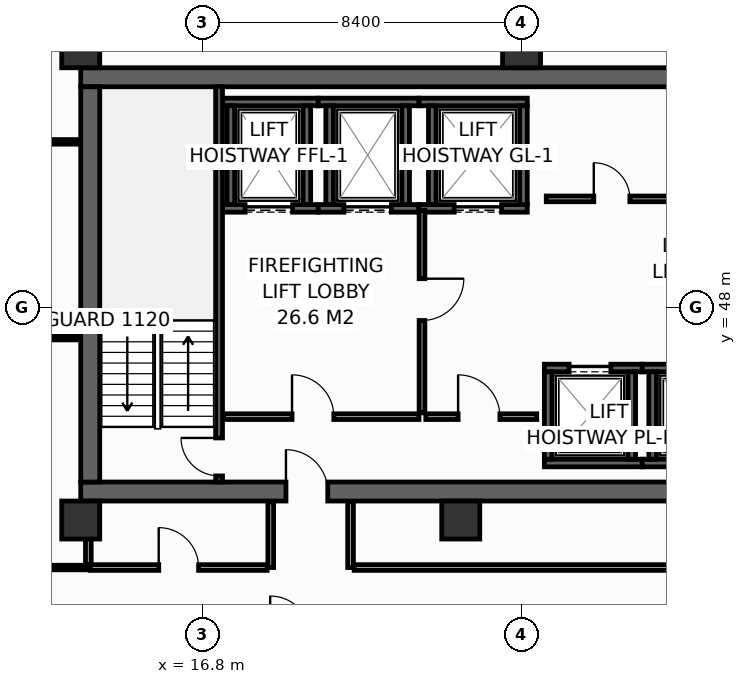
"""IFC4 building model, lengths in metres.
Left out: names, types, materials, properties, quantities, classifications, styles, units other than length and angle.
Written with IfcOpenShell. Run it as: python <this file> out.ifc"""

import sys

from ifc_helpers import new_model, si_unit, direction, frame, frame_2d, origin, origin_2d, place, context, subcontext, project, spatial, rectangle, hollow_rectangle, extrude, element, fill, save


model = new_model("IFC4")
c1 = context("Model", 3, precision=1e-05, world=origin(), true_north=direction((0.0, 1.0)))
c2 = subcontext(c1, "Body", "Model", "MODEL_VIEW")
j1 = project(units=[si_unit("LENGTHUNIT", "METRE"), si_unit("PLANEANGLEUNIT", "RADIAN")], contexts=[c1])
p1 = place(None, origin())
s1 = spatial("IfcSite", under=j1, at=p1, CompositionType="ELEMENT")
p2 = place(p1, origin())
s2 = spatial("IfcBuilding", under=s1, at=p2, CompositionType="ELEMENT")
p3 = place(p2, frame((0.0, 0.0, 156.2)))
s3 = spatial("IfcBuildingStorey", under=s2, at=p3, CompositionType="ELEMENT", Elevation=156.2)
p4 = place(p3, frame((13.6, 43.15, 0.0), z_axis=(0.0, 0.0, 1.0), x_axis=(1.0, 0.0, 0.0)))
e1 = element("IfcWall", 1, at=p4, inside=s3, PredefinedType="SHEAR", context=c2, shape_type="SweptSolid", body=[
    extrude(rectangle(XDim=32.7, YDim=0.5, at=frame_2d((16.35, 0.0))), origin(), (0.0, 0.0, 1.0), 3.55),
])
p5 = place(p4, frame((5.4, 0.0, 0.0)))
e2 = element("IfcOpeningElement", 2, at=p5, cuts=e1, PredefinedType="OPENING", context=c2, shape_type="SweptSolid", body=[
    extrude(rectangle(XDim=1.1, YDim=2.15, at=frame_2d((0.55, 1.075))), frame((0.0, 0.26, 0.0), z_axis=(0.0, -1.0, 0.0), x_axis=(1.0, 0.0, 0.0)), (0.0, 0.0, 1.0), 0.52),
])
p6 = place(p4, frame((25.6, 0.0, 0.0)))
e3 = element("IfcOpeningElement", 3, at=p6, cuts=e1, PredefinedType="OPENING", context=c2, shape_type="SweptSolid", body=[
    extrude(rectangle(XDim=1.1, YDim=2.15, at=frame_2d((0.55, 1.075))), frame((0.0, 0.26, 0.0), z_axis=(0.0, -1.0, 0.0), x_axis=(1.0, 0.0, 0.0)), (0.0, 0.0, 1.0), 0.52),
])
p7 = place(p3, frame((13.6, 54.05, 0.0), z_axis=(0.0, 0.0, 1.0), x_axis=(1.0, 0.0, 0.0)))
e4 = element("IfcWall", 4, at=p7, inside=s3, PredefinedType="SHEAR", context=c2, shape_type="SweptSolid", body=[
    extrude(rectangle(XDim=32.7, YDim=0.5, at=frame_2d((16.35, 0.0))), origin(), (0.0, 0.0, 1.0), 3.55),
])
p8 = place(p3, frame((13.85, 43.4, 0.0), z_axis=(0.0, 0.0, 1.0), x_axis=(0.0, 1.0, 0.0)))
e5 = element("IfcWall", 5, at=p8, inside=s3, PredefinedType="SHEAR", context=c2, shape_type="SweptSolid", body=[
    extrude(rectangle(XDim=10.4, YDim=0.5, at=frame_2d((5.2, 0.0))), origin(), (0.0, 0.0, 1.0), 3.55),
])
for number, where, z_axis, x_axis in (
    (6, (13.6, 54.8, 0.0), (0.0, 0.0, 1.0), (1.0, 0.0, 0.0)),
    (7, (25.2, 54.8, 0.0), (0.0, 0.0, 1.0), (1.0, 0.0, 0.0)),
    (8, (13.6, 42.4, 0.0), (0.0, 0.0, 1.0), (1.0, 0.0, 0.0)),
    (9, (23.6, 42.4, 0.0), (0.0, 0.0, 1.0), (1.0, 0.0, 0.0)),
):
    element("IfcColumn", number, at=place(p3, frame(where, z_axis=z_axis, x_axis=x_axis)), inside=s3, PredefinedType="COLUMN", context=c2, shape_type="SweptSolid", body=[
        extrude(hollow_rectangle(XDim=1.0, YDim=1.0, WallThickness=0.045, at=origin_2d()), origin(), (0.0, 0.0, 1.0), 3.8),
    ])
p9 = place(p3, frame((17.33, 50.6, 0.0), z_axis=(0.0, 0.0, 1.0), x_axis=(1.0, 0.0, 0.0)))
e10 = element("IfcWall", 10, at=p9, inside=s3, PredefinedType="SHEAR", context=c2, shape_type="SweptSolid", body=[
    extrude(rectangle(XDim=2.52, YDim=0.2, at=frame_2d((1.26, 0.0))), origin(), (0.0, 0.0, 1.0), 3.55),
])
p10 = place(p9, frame((0.595, 0.0, 0.0)))
e11 = element("IfcOpeningElement", 11, at=p10, cuts=e10, PredefinedType="OPENING", context=c2, shape_type="SweptSolid", body=[
    extrude(rectangle(XDim=1.25, YDim=2.3, at=frame_2d((0.625, 1.15))), frame((0.0, 0.11, 0.0), z_axis=(0.0, -1.0, 0.0), x_axis=(1.0, 0.0, 0.0)), (0.0, 0.0, 1.0), 0.22),
])
p11 = place(p3, frame((17.33, 53.4, 0.0), z_axis=(0.0, 0.0, 1.0), x_axis=(1.0, 0.0, 0.0)))
e12 = element("IfcWall", 12, at=p11, inside=s3, PredefinedType="SHEAR", context=c2, shape_type="SweptSolid", body=[
    extrude(rectangle(XDim=2.52, YDim=0.2, at=frame_2d((1.26, 0.0))), origin(), (0.0, 0.0, 1.0), 3.55),
])
for number, where, z_axis, x_axis in (
    (13, (17.55, 50.7, 0.0), (0.0, 0.0, 1.0), (0.0, 1.0, 0.0)),
    (14, (19.55, 50.7, 0.0), (0.0, 0.0, 1.0), (0.0, 1.0, 0.0)),
):
    element("IfcWall", number, at=place(p3, frame(where, z_axis=z_axis, x_axis=x_axis)), inside=s3, PredefinedType="SHEAR", context=c2, shape_type="SweptSolid", body=[
        extrude(rectangle(XDim=2.6, YDim=0.2, at=frame_2d((1.3, 0.0))), origin(), (0.0, 0.0, 1.0), 3.55),
    ])
p12 = place(p3, frame((19.85, 50.6, 0.0), z_axis=(0.0, 0.0, 1.0), x_axis=(1.0, 0.0, 0.0)))
e15 = element("IfcWall", 15, at=p12, inside=s3, PredefinedType="SHEAR", context=c2, shape_type="SweptSolid", body=[
    extrude(rectangle(XDim=2.65, YDim=0.2, at=frame_2d((1.325, 0.0))), origin(), (0.0, 0.0, 1.0), 3.55),
])
p13 = place(p12, frame((0.675, 0.0, 0.0)))
e16 = element("IfcOpeningElement", 16, at=p13, cuts=e15, PredefinedType="OPENING", context=c2, shape_type="SweptSolid", body=[
    extrude(rectangle(XDim=1.25, YDim=2.3, at=frame_2d((0.625, 1.15))), frame((0.0, 0.11, 0.0), z_axis=(0.0, -1.0, 0.0), x_axis=(1.0, 0.0, 0.0)), (0.0, 0.0, 1.0), 0.22),
])
p14 = place(p3, frame((19.85, 53.4, 0.0), z_axis=(0.0, 0.0, 1.0), x_axis=(1.0, 0.0, 0.0)))
e17 = element("IfcWall", 17, at=p14, inside=s3, PredefinedType="SHEAR", context=c2, shape_type="SweptSolid", body=[
    extrude(rectangle(XDim=2.65, YDim=0.2, at=frame_2d((1.325, 0.0))), origin(), (0.0, 0.0, 1.0), 3.55),
])
for number, where, z_axis, x_axis in (
    (18, (20.15, 50.7, 0.0), (0.0, 0.0, 1.0), (0.0, 1.0, 0.0)),
    (19, (22.15, 50.7, 0.0), (0.0, 0.0, 1.0), (0.0, 1.0, 0.0)),
):
    element("IfcWall", number, at=place(p3, frame(where, z_axis=z_axis, x_axis=x_axis)), inside=s3, PredefinedType="SHEAR", context=c2, shape_type="SweptSolid", body=[
        extrude(rectangle(XDim=2.6, YDim=0.2, at=frame_2d((1.3, 0.0))), origin(), (0.0, 0.0, 1.0), 3.55),
    ])
p15 = place(p3, frame((22.5, 50.6, 0.0), z_axis=(0.0, 0.0, 1.0), x_axis=(1.0, 0.0, 0.0)))
e20 = element("IfcWall", 20, at=p15, inside=s3, PredefinedType="SHEAR", context=c2, shape_type="SweptSolid", body=[
    extrude(rectangle(XDim=2.85, YDim=0.2, at=frame_2d((1.425, 0.0))), origin(), (0.0, 0.0, 1.0), 3.55),
])
p16 = place(p15, frame((0.925, 0.0, 0.0)))
e21 = element("IfcOpeningElement", 21, at=p16, cuts=e20, PredefinedType="OPENING", context=c2, shape_type="SweptSolid", body=[
    extrude(rectangle(XDim=1.25, YDim=2.3, at=frame_2d((0.625, 1.15))), frame((0.0, 0.11, 0.0), z_axis=(0.0, -1.0, 0.0), x_axis=(1.0, 0.0, 0.0)), (0.0, 0.0, 1.0), 0.22),
])
p17 = place(p3, frame((22.5, 53.4, 0.0), z_axis=(0.0, 0.0, 1.0), x_axis=(1.0, 0.0, 0.0)))
e22 = element("IfcWall", 22, at=p17, inside=s3, PredefinedType="SHEAR", context=c2, shape_type="SweptSolid", body=[
    extrude(rectangle(XDim=2.85, YDim=0.2, at=frame_2d((1.425, 0.0))), origin(), (0.0, 0.0, 1.0), 3.55),
])
for number, where, z_axis, x_axis in (
    (23, (22.85, 50.7, 0.0), (0.0, 0.0, 1.0), (0.0, 1.0, 0.0)),
    (24, (25.25, 50.7, 0.0), (0.0, 0.0, 1.0), (0.0, 1.0, 0.0)),
):
    element("IfcWall", number, at=place(p3, frame(where, z_axis=z_axis, x_axis=x_axis)), inside=s3, PredefinedType="SHEAR", context=c2, shape_type="SweptSolid", body=[
        extrude(rectangle(XDim=2.6, YDim=0.2, at=frame_2d((1.3, 0.0))), origin(), (0.0, 0.0, 1.0), 3.55),
    ])
p18 = place(p3, frame((25.8, 43.9, 0.0), z_axis=(0.0, 0.0, 1.0), x_axis=(1.0, 0.0, 0.0)))
e25 = element("IfcWall", 25, at=p18, inside=s3, PredefinedType="SHEAR", context=c2, shape_type="SweptSolid", body=[
    extrude(rectangle(XDim=2.575, YDim=0.2, at=frame_2d((1.288, 0.0))), origin(), (0.0, 0.0, 1.0), 3.55),
])
p19 = place(p3, frame((25.8, 46.4, 0.0), z_axis=(0.0, 0.0, 1.0), x_axis=(1.0, 0.0, 0.0)))
e26 = element("IfcWall", 26, at=p19, inside=s3, PredefinedType="SHEAR", context=c2, shape_type="SweptSolid", body=[
    extrude(rectangle(XDim=2.575, YDim=0.2, at=frame_2d((1.288, 0.0))), origin(), (0.0, 0.0, 1.0), 3.55),
])
p20 = place(p19, frame((0.65, 0.0, 0.0)))
e27 = element("IfcOpeningElement", 27, at=p20, cuts=e26, PredefinedType="OPENING", context=c2, shape_type="SweptSolid", body=[
    extrude(rectangle(XDim=1.1, YDim=2.2, at=frame_2d((0.55, 1.1))), frame((0.0, 0.11, 0.0), z_axis=(0.0, -1.0, 0.0), x_axis=(1.0, 0.0, 0.0)), (0.0, 0.0, 1.0), 0.22),
])
for number, where, z_axis, x_axis in (
    (28, (25.9, 44.0, 0.0), (0.0, 0.0, 1.0), (0.0, 1.0, 0.0)),
    (29, (28.1, 44.0, 0.0), (0.0, 0.0, 1.0), (0.0, 1.0, 0.0)),
):
    element("IfcWall", number, at=place(p3, frame(where, z_axis=z_axis, x_axis=x_axis)), inside=s3, PredefinedType="SHEAR", context=c2, shape_type="SweptSolid", body=[
        extrude(rectangle(XDim=2.3, YDim=0.2, at=frame_2d((1.15, 0.0))), origin(), (0.0, 0.0, 1.0), 3.55),
    ])
p21 = place(p3, frame((28.375, 43.9, 0.0), z_axis=(0.0, 0.0, 1.0), x_axis=(1.0, 0.0, 0.0)))
e30 = element("IfcWall", 30, at=p21, inside=s3, PredefinedType="SHEAR", context=c2, shape_type="SweptSolid", body=[
    extrude(rectangle(XDim=2.75, YDim=0.2, at=frame_2d((1.375, 0.0))), origin(), (0.0, 0.0, 1.0), 3.55),
])
p22 = place(p3, frame((28.375, 46.4, 0.0), z_axis=(0.0, 0.0, 1.0), x_axis=(1.0, 0.0, 0.0)))
e31 = element("IfcWall", 31, at=p22, inside=s3, PredefinedType="SHEAR", context=c2, shape_type="SweptSolid", body=[
    extrude(rectangle(XDim=2.75, YDim=0.2, at=frame_2d((1.375, 0.0))), origin(), (0.0, 0.0, 1.0), 3.55),
])
p23 = place(p22, frame((0.825, 0.0, 0.0)))
e32 = element("IfcOpeningElement", 32, at=p23, cuts=e31, PredefinedType="OPENING", context=c2, shape_type="SweptSolid", body=[
    extrude(rectangle(XDim=1.1, YDim=2.2, at=frame_2d((0.55, 1.1))), frame((0.0, 0.11, 0.0), z_axis=(0.0, -1.0, 0.0), x_axis=(1.0, 0.0, 0.0)), (0.0, 0.0, 1.0), 0.22),
])
p24 = place(p3, frame((28.65, 44.0, 0.0), z_axis=(0.0, 0.0, 1.0), x_axis=(0.0, 1.0, 0.0)))
e33 = element("IfcWall", 33, at=p24, inside=s3, PredefinedType="SHEAR", context=c2, shape_type="SweptSolid", body=[
    extrude(rectangle(XDim=2.3, YDim=0.2, at=frame_2d((1.15, 0.0))), origin(), (0.0, 0.0, 1.0), 3.55),
])
p25 = place(p3, frame((17.24, 43.4, 0.0), z_axis=(0.0, 0.0, 1.0), x_axis=(0.0, 1.0, 0.0)))
e34 = element("IfcWall", 34, at=p25, inside=s3, PredefinedType="SHEAR", context=c2, shape_type="SweptSolid", body=[
    extrude(rectangle(XDim=10.4, YDim=0.18, at=frame_2d((5.2, 0.0))), origin(), (0.0, 0.0, 1.0), 3.55),
])
p26 = place(p25, frame((0.16, 0.0, 0.0)))
e35 = element("IfcOpeningElement", 35, at=p26, cuts=e34, PredefinedType="OPENING", context=c2, shape_type="SweptSolid", body=[
    extrude(rectangle(XDim=1.0, YDim=2.15, at=frame_2d((0.5, 1.075))), frame((0.0, 0.1, 0.0), z_axis=(0.0, -1.0, 0.0), x_axis=(1.0, 0.0, 0.0)), (0.0, 0.0, 1.0), 0.2),
])
p27 = place(p3, frame((17.36, 45.12, 0.0), z_axis=(0.0, 0.0, 1.0), x_axis=(1.0, 0.0, 0.0)))
e36 = element("IfcWall", 36, at=p27, inside=s3, PredefinedType="PARTITIONING", context=c2, shape_type="SweptSolid", body=[
    extrude(rectangle(XDim=5.14, YDim=0.15, at=frame_2d((2.57, 0.0))), origin(), (0.0, 0.0, 1.0), 3.55),
])
p28 = place(p27, frame((1.8, 0.0, 0.0)))
e37 = element("IfcOpeningElement", 37, at=p28, cuts=e36, PredefinedType="OPENING", context=c2, shape_type="SweptSolid", body=[
    extrude(rectangle(XDim=1.1, YDim=2.15, at=frame_2d((0.55, 1.075))), frame((0.0, 0.085, 0.0), z_axis=(0.0, -1.0, 0.0), x_axis=(1.0, 0.0, 0.0)), (0.0, 0.0, 1.0), 0.17),
])
p29 = place(p3, frame((22.58, 50.55, 0.0), z_axis=(0.0, 0.0, 1.0), x_axis=(0.0, -1.0, 0.0)))
e38 = element("IfcWall", 38, at=p29, inside=s3, PredefinedType="PARTITIONING", context=c2, shape_type="SweptSolid", body=[
    extrude(rectangle(XDim=5.33, YDim=0.15, at=frame_2d((2.665, 0.0))), origin(), (0.0, 0.0, 1.0), 3.55),
])
p30 = place(p29, frame((1.8, 0.0, 0.0)))
e39 = element("IfcOpeningElement", 39, at=p30, cuts=e38, PredefinedType="OPENING", context=c2, shape_type="SweptSolid", body=[
    extrude(rectangle(XDim=1.1, YDim=2.15, at=frame_2d((0.55, 1.075))), frame((0.0, 0.085, 0.0), z_axis=(0.0, -1.0, 0.0), x_axis=(1.0, 0.0, 0.0)), (0.0, 0.0, 1.0), 0.17),
])
p31 = place(p3, frame((22.68, 45.12, 0.0), z_axis=(0.0, 0.0, 1.0), x_axis=(1.0, 0.0, 0.0)))
e40 = element("IfcWall", 40, at=p31, inside=s3, PredefinedType="PARTITIONING", context=c2, shape_type="SweptSolid", body=[
    extrude(rectangle(XDim=2.92, YDim=0.15, at=frame_2d((1.46, 0.0))), origin(), (0.0, 0.0, 1.0), 3.55),
])
p32 = place(p31, frame((0.85, 0.0, 0.0)))
e41 = element("IfcOpeningElement", 41, at=p32, cuts=e40, PredefinedType="OPENING", context=c2, shape_type="SweptSolid", body=[
    extrude(rectangle(XDim=1.1, YDim=2.15, at=frame_2d((0.55, 1.075))), frame((0.0, 0.085, 0.0), z_axis=(0.0, -1.0, 0.0), x_axis=(1.0, 0.0, 0.0)), (0.0, 0.0, 1.0), 0.17),
])
p33 = place(p3, frame((25.85, 50.85, 0.0), z_axis=(0.0, 0.0, 1.0), x_axis=(1.0, 0.0, 0.0)))
e42 = element("IfcWall", 42, at=p33, inside=s3, PredefinedType="PARTITIONING", context=c2, shape_type="SweptSolid", body=[
    extrude(rectangle(XDim=7.65, YDim=0.15, at=frame_2d((3.825, 0.0))), origin(), (0.0, 0.0, 1.0), 3.55),
])
p34 = place(p33, frame((1.25, 0.0, 0.0)))
e43 = element("IfcOpeningElement", 43, at=p34, cuts=e42, PredefinedType="OPENING", context=c2, shape_type="SweptSolid", body=[
    extrude(rectangle(XDim=0.95, YDim=2.15, at=frame_2d((0.475, 1.075))), frame((0.0, 0.085, 0.0), z_axis=(0.0, -1.0, 0.0), x_axis=(1.0, 0.0, 0.0)), (0.0, 0.0, 1.0), 0.17),
])
p35 = place(p3, frame((11.5, 41.15, 0.0), z_axis=(0.0, 0.0, 1.0), x_axis=(1.0, 0.0, 0.0)))
e44 = element("IfcWall", 44, at=p35, inside=s3, PredefinedType="PARTITIONING", context=c2, shape_type="SweptSolid", body=[
    extrude(rectangle(XDim=2.35, YDim=0.12, at=frame_2d((1.175, 0.0))), origin(), (0.0, 0.0, 1.0), 3.55),
])
for number, where, z_axis, x_axis in (
    (45, (11.55, 52.35, 0.0), (0.0, 0.0, 1.0), (1.0, 0.0, 0.0)),
    (46, (11.55, 47.2, 0.0), (0.0, 0.0, 1.0), (1.0, 0.0, 0.0)),
):
    element("IfcWall", number, at=place(p3, frame(where, z_axis=z_axis, x_axis=x_axis)), inside=s3, PredefinedType="PARTITIONING", context=c2, shape_type="SweptSolid", body=[
        extrude(rectangle(XDim=2.03, YDim=0.12, at=frame_2d((1.015, 0.0))), origin(), (0.0, 0.0, 1.0), 3.55),
    ])
p36 = place(p3, frame((13.8, 41.23, 0.0), z_axis=(0.0, 0.0, 1.0), x_axis=(0.0, 1.0, 0.0)))
e47 = element("IfcWall", 47, at=p36, inside=s3, PredefinedType="PARTITIONING", context=c2, shape_type="SweptSolid", body=[
    extrude(rectangle(XDim=1.65, YDim=0.15, at=frame_2d((0.825, 0.0))), origin(), (0.0, 0.0, 1.0), 3.55),
])
for number, where, z_axis, x_axis in (
    (48, (18.6, 41.15, 0.0), (0.0, 0.0, 1.0), (0.0, 1.0, 0.0)),
    (49, (20.7, 41.15, 0.0), (0.0, 0.0, 1.0), (0.0, 1.0, 0.0)),
):
    element("IfcWall", number, at=place(p3, frame(where, z_axis=z_axis, x_axis=x_axis)), inside=s3, PredefinedType="PARTITIONING", context=c2, shape_type="SweptSolid", body=[
        extrude(rectangle(XDim=1.73, YDim=0.15, at=frame_2d((0.865, 0.0))), origin(), (0.0, 0.0, 1.0), 3.55),
    ])
p37 = place(p3, frame((13.85, 41.15, 0.0), z_axis=(0.0, 0.0, 1.0), x_axis=(1.0, 0.0, 0.0)))
e50 = element("IfcWall", 50, at=p37, inside=s3, PredefinedType="PARTITIONING", context=c2, shape_type="SweptSolid", body=[
    extrude(rectangle(XDim=4.655, YDim=0.15, at=frame_2d((2.327, 0.0))), origin(), (0.0, 0.0, 1.0), 3.55),
])
p38 = place(p37, frame((1.802, 0.0, 0.0)))
e51 = element("IfcOpeningElement", 51, at=p38, cuts=e50, PredefinedType="OPENING", context=c2, shape_type="SweptSolid", body=[
    extrude(rectangle(XDim=1.05, YDim=2.15, at=frame_2d((0.525, 1.075))), frame((0.0, 0.085, 0.0), z_axis=(0.0, -1.0, 0.0), x_axis=(1.0, 0.0, 0.0)), (0.0, 0.0, 1.0), 0.17),
])
p39 = place(p3, frame((20.795, 41.15, 0.0), z_axis=(0.0, 0.0, 1.0), x_axis=(1.0, 0.0, 0.0)))
e52 = element("IfcWall", 52, at=p39, inside=s3, PredefinedType="PARTITIONING", context=c2, shape_type="SweptSolid", body=[
    extrude(rectangle(XDim=17.91, YDim=0.15, at=frame_2d((8.955, 0.0))), origin(), (0.0, 0.0, 1.0), 2.835),
])
p40 = place(p39, frame((8.43, 0.0, 0.0)))
e53 = element("IfcOpeningElement", 53, at=p40, cuts=e52, PredefinedType="OPENING", context=c2, shape_type="SweptSolid", body=[
    extrude(rectangle(XDim=1.05, YDim=2.15, at=frame_2d((0.525, 1.075))), frame((0.0, 0.085, 0.0), z_axis=(0.0, -1.0, 0.0), x_axis=(1.0, 0.0, 0.0)), (0.0, 0.0, 1.0), 0.17),
])
p41 = place(p10, origin())
e54 = element("IfcDoor", 54, at=p41, inside=s3, OperationType="SLIDING_TO_LEFT", PredefinedType="DOOR", context=c2, shape_type="SweptSolid", body=[
    extrude(rectangle(XDim=1.25, YDim=2.3, at=frame_2d((0.625, 1.15))), frame((0.0, 0.025, 0.0), z_axis=(0.0, -1.0, 0.0), x_axis=(1.0, 0.0, 0.0)), (0.0, 0.0, 1.0), 0.05),
])
fill(e11, e54)
p42 = place(p13, origin())
e55 = element("IfcDoor", 55, at=p42, inside=s3, OperationType="SLIDING_TO_LEFT", PredefinedType="DOOR", context=c2, shape_type="SweptSolid", body=[
    extrude(rectangle(XDim=1.25, YDim=2.3, at=frame_2d((0.625, 1.15))), frame((0.0, 0.025, 0.0), z_axis=(0.0, -1.0, 0.0), x_axis=(1.0, 0.0, 0.0)), (0.0, 0.0, 1.0), 0.05),
])
fill(e16, e55)
p43 = place(p16, origin())
e56 = element("IfcDoor", 56, at=p43, inside=s3, OperationType="SLIDING_TO_LEFT", PredefinedType="DOOR", context=c2, shape_type="SweptSolid", body=[
    extrude(rectangle(XDim=1.25, YDim=2.3, at=frame_2d((0.625, 1.15))), frame((0.0, 0.025, 0.0), z_axis=(0.0, -1.0, 0.0), x_axis=(1.0, 0.0, 0.0)), (0.0, 0.0, 1.0), 0.05),
])
fill(e21, e56)
p44 = place(p20, origin())
e57 = element("IfcDoor", 57, at=p44, inside=s3, OperationType="SLIDING_TO_LEFT", PredefinedType="DOOR", context=c2, shape_type="SweptSolid", body=[
    extrude(rectangle(XDim=1.1, YDim=2.2, at=frame_2d((0.55, 1.1))), frame((0.0, 0.025, 0.0), z_axis=(0.0, -1.0, 0.0), x_axis=(1.0, 0.0, 0.0)), (0.0, 0.0, 1.0), 0.05),
])
fill(e27, e57)
p45 = place(p26, origin())
e58 = element("IfcDoor", 58, at=p45, inside=s3, OperationType="SINGLE_SWING_RIGHT", PredefinedType="DOOR", context=c2, shape_type="SweptSolid", body=[
    extrude(rectangle(XDim=1.0, YDim=2.15, at=frame_2d((0.5, 1.075))), frame((0.0, 0.025, 0.0), z_axis=(0.0, -1.0, 0.0), x_axis=(1.0, 0.0, 0.0)), (0.0, 0.0, 1.0), 0.05),
])
fill(e35, e58)
p46 = place(p28, origin())
e59 = element("IfcDoor", 59, at=p46, inside=s3, OperationType="SINGLE_SWING_LEFT", PredefinedType="DOOR", context=c2, shape_type="SweptSolid", body=[
    extrude(rectangle(XDim=1.1, YDim=2.15, at=frame_2d((0.55, 1.075))), frame((0.0, 0.025, 0.0), z_axis=(0.0, -1.0, 0.0), x_axis=(1.0, 0.0, 0.0)), (0.0, 0.0, 1.0), 0.05),
])
fill(e37, e59)
p47 = place(p30, origin())
e60 = element("IfcDoor", 60, at=p47, inside=s3, OperationType="SINGLE_SWING_LEFT", PredefinedType="DOOR", context=c2, shape_type="SweptSolid", body=[
    extrude(rectangle(XDim=1.1, YDim=2.15, at=frame_2d((0.55, 1.075))), frame((0.0, 0.025, 0.0), z_axis=(0.0, -1.0, 0.0), x_axis=(1.0, 0.0, 0.0)), (0.0, 0.0, 1.0), 0.05),
])
fill(e39, e60)
p48 = place(p32, origin())
e61 = element("IfcDoor", 61, at=p48, inside=s3, OperationType="SINGLE_SWING_LEFT", PredefinedType="DOOR", context=c2, shape_type="SweptSolid", body=[
    extrude(rectangle(XDim=1.1, YDim=2.15, at=frame_2d((0.55, 1.075))), frame((0.0, 0.025, 0.0), z_axis=(0.0, -1.0, 0.0), x_axis=(1.0, 0.0, 0.0)), (0.0, 0.0, 1.0), 0.05),
])
fill(e41, e61)
p49 = place(p5, origin())
e62 = element("IfcDoor", 62, at=p49, inside=s3, OperationType="SINGLE_SWING_LEFT", PredefinedType="DOOR", context=c2, shape_type="SweptSolid", body=[
    extrude(rectangle(XDim=1.1, YDim=2.15, at=frame_2d((0.55, 1.075))), frame((0.0, 0.025, 0.0), z_axis=(0.0, -1.0, 0.0), x_axis=(1.0, 0.0, 0.0)), (0.0, 0.0, 1.0), 0.05),
])
fill(e2, e62)
p50 = place(p34, origin())
e63 = element("IfcDoor", 63, at=p50, inside=s3, OperationType="SINGLE_SWING_LEFT", PredefinedType="DOOR", context=c2, shape_type="SweptSolid", body=[
    extrude(rectangle(XDim=0.95, YDim=2.15, at=frame_2d((0.475, 1.075))), frame((0.0, 0.025, 0.0), z_axis=(0.0, -1.0, 0.0), x_axis=(1.0, 0.0, 0.0)), (0.0, 0.0, 1.0), 0.05),
])
fill(e43, e63)
p51 = place(p38, origin())
e64 = element("IfcDoor", 64, at=p51, inside=s3, OperationType="SINGLE_SWING_LEFT", PredefinedType="DOOR", context=c2, shape_type="SweptSolid", body=[
    extrude(rectangle(XDim=1.05, YDim=2.15, at=frame_2d((0.525, 1.075))), frame((0.0, 0.025, 0.0), z_axis=(0.0, -1.0, 0.0), x_axis=(1.0, 0.0, 0.0)), (0.0, 0.0, 1.0), 0.05),
])
fill(e51, e64)
save(model, sys.argv[1])
